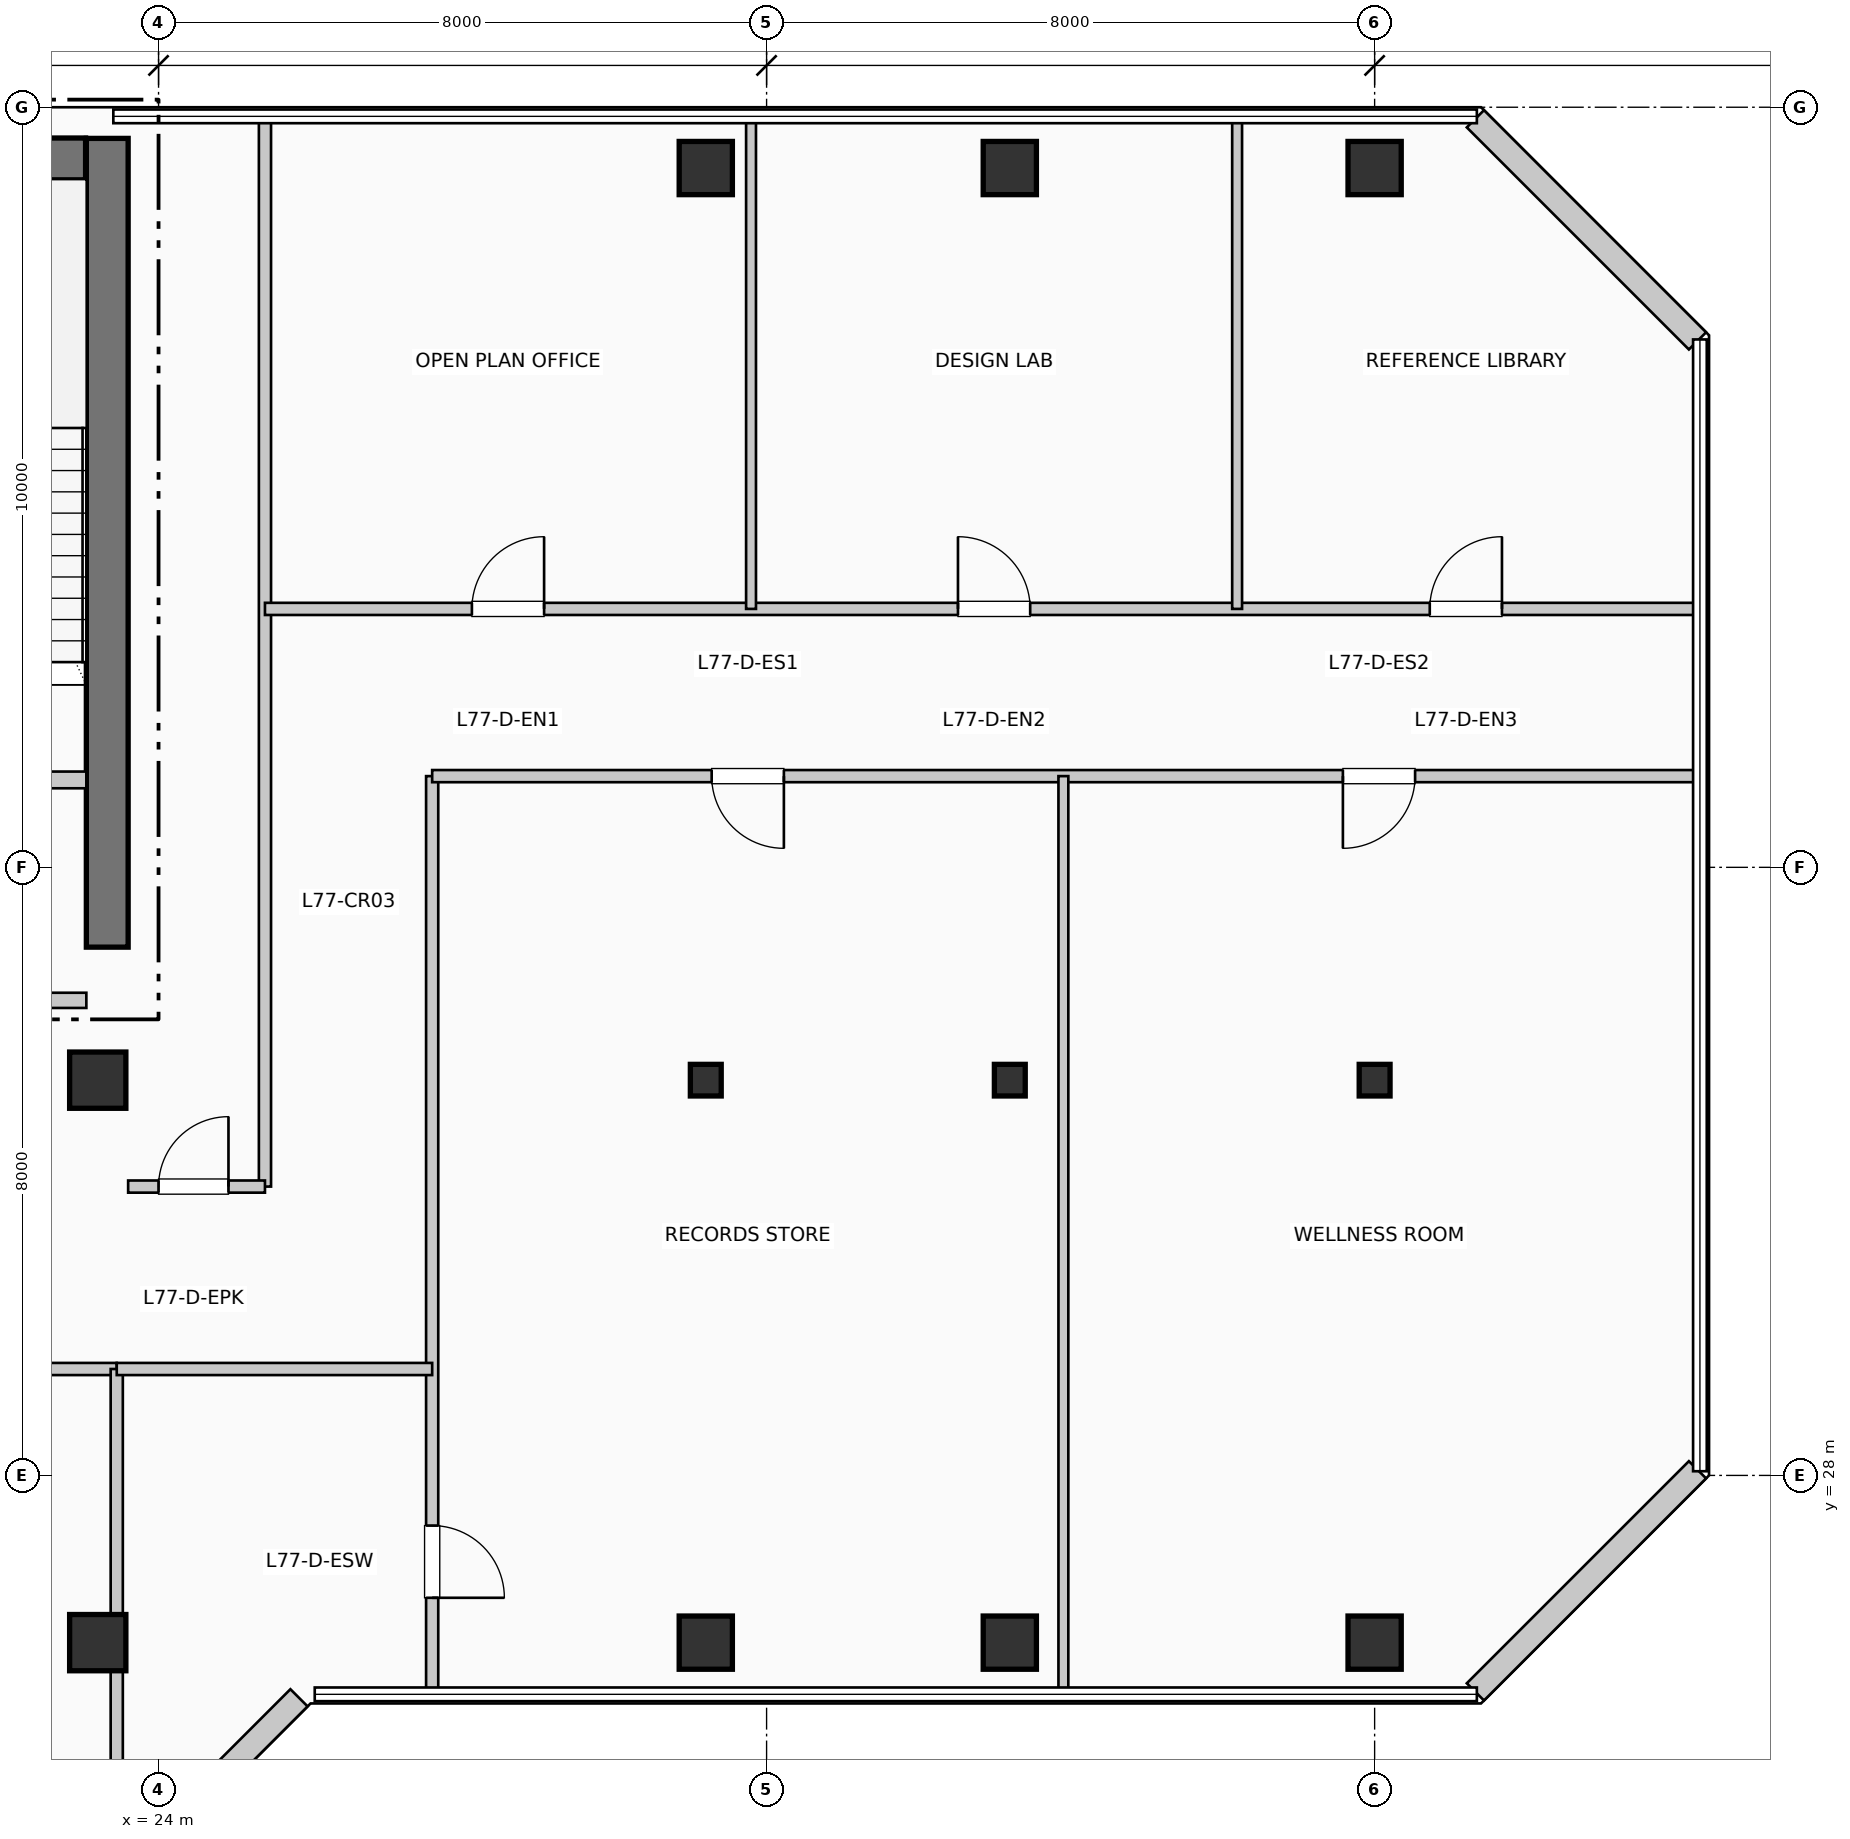
"""IFC4 building model, lengths in metres.
Left out: names, types, materials, properties, quantities, classifications, styles, units other than length and angle.
Written with IfcOpenShell. Run it as: python <this file> out.ifc"""

import sys

from ifc_helpers import new_model, si_unit, direction, frame, frame_2d, origin, origin_2d, place, context, subcontext, project, spatial, rectangle, i_section, extrude, element, fill, save


model = new_model("IFC4")
c1 = context("Model", 3, precision=1e-05, world=origin(), true_north=direction((0.0, 1.0)))
c2 = subcontext(c1, "Body", "Model", "MODEL_VIEW")
j1 = project(units=[si_unit("LENGTHUNIT", "METRE"), si_unit("PLANEANGLEUNIT", "RADIAN")], contexts=[c1])
p1 = place(None, origin())
s1 = spatial("IfcSite", under=j1, at=p1, CompositionType="ELEMENT")
p2 = place(p1, origin())
s2 = spatial("IfcBuilding", under=s1, at=p2, CompositionType="ELEMENT")
p3 = place(p2, frame((0.0, 0.0, 315.81)))
s3 = spatial("IfcBuildingStorey", under=s2, at=p3, CompositionType="ELEMENT", Elevation=315.81)
p4 = place(p3, frame((23.325, 34.95, 0.0), z_axis=(0.0, 0.0, 1.0), x_axis=(0.0, 1.0, 0.0)))
e1 = element("IfcWall", 1, at=p4, inside=s3, PredefinedType="SHEAR", context=c2, shape_type="SweptSolid", body=[
    extrude(rectangle(XDim=10.64, YDim=0.55, at=frame_2d((5.32, 0.0))), origin(), (0.0, 0.0, 1.0), 3.96),
])
p5 = place(p3, frame((19.35, 45.32, 0.0), z_axis=(0.0, 0.0, 1.0), x_axis=(1.0, 0.0, 0.0)))
e2 = element("IfcWall", 2, at=p5, inside=s3, PredefinedType="SHEAR", context=c2, shape_type="SweptSolid", body=[
    extrude(rectangle(XDim=3.69, YDim=0.55, at=frame_2d((1.845, 0.0))), origin(), (0.0, 0.0, 1.0), 3.96),
])
p6 = place(p5, frame((1.15, 0.0, 1.05)))
e3 = element("IfcOpeningElement", 3, at=p6, cuts=e2, PredefinedType="OPENING", context=c2, shape_type="SweptSolid", body=[
    extrude(rectangle(XDim=1.4, YDim=1.8, at=frame_2d((0.7, 0.9))), frame((0.0, 0.285, 0.0), z_axis=(0.0, -1.0, 0.0), x_axis=(1.0, 0.0, 0.0)), (0.0, 0.0, 1.0), 0.57),
])
for number, where, z_axis, x_axis in (
    (4, (23.2, 25.8, 0.0), (0.0, 0.0, 1.0), (1.0, 0.0, 0.0)),
    (5, (23.2, 33.2, 0.0), (0.0, 0.0, 1.0), (1.0, 0.0, 0.0)),
):
    element("IfcColumn", number, at=place(p3, frame(where, z_axis=z_axis, x_axis=x_axis)), inside=s3, PredefinedType="COLUMN", context=c2, shape_type="SweptSolid", body=[
        extrude(rectangle(XDim=0.74, YDim=0.74, at=origin_2d()), origin(), (0.0, 0.0, 1.0), 3.96),
    ])
p7 = place(p3, frame((31.2, 25.8, 0.0), z_axis=(0.0, 0.0, 1.0), x_axis=(1.0, 0.0, 0.0)))
e6 = element("IfcColumn", 6, at=p7, inside=s3, PredefinedType="COLUMN", context=c2, shape_type="SweptSolid", body=[
    extrude(rectangle(XDim=0.7, YDim=0.7, at=origin_2d()), origin(), (0.0, 0.0, 1.0), 3.96),
])
p8 = place(p3, frame((31.2, 33.2, 0.0), z_axis=(0.0, 0.0, 1.0), x_axis=(1.0, 0.0, 0.0)))
e7 = element("IfcColumn", 7, at=p8, inside=s3, PredefinedType="COLUMN", context=c2, shape_type="SweptSolid", body=[
    extrude(i_section(OverallWidth=0.406, OverallDepth=0.416, WebThickness=0.022, FlangeThickness=0.036, at=origin_2d()), origin(), (0.0, 0.0, 1.0), 3.96),
])
for number, where, z_axis, x_axis in (
    (8, (31.2, 45.2, 0.0), (0.0, 0.0, 1.0), (1.0, 0.0, 0.0)),
    (9, (35.2, 25.8, 0.0), (0.0, 0.0, 1.0), (1.0, 0.0, 0.0)),
):
    element("IfcColumn", number, at=place(p3, frame(where, z_axis=z_axis, x_axis=x_axis)), inside=s3, PredefinedType="COLUMN", context=c2, shape_type="SweptSolid", body=[
        extrude(rectangle(XDim=0.7, YDim=0.7, at=origin_2d()), origin(), (0.0, 0.0, 1.0), 3.96),
    ])
p9 = place(p3, frame((35.2, 33.2, 0.0), z_axis=(0.0, 0.0, 1.0), x_axis=(1.0, 0.0, 0.0)))
e10 = element("IfcColumn", 10, at=p9, inside=s3, PredefinedType="COLUMN", context=c2, shape_type="SweptSolid", body=[
    extrude(i_section(OverallWidth=0.406, OverallDepth=0.416, WebThickness=0.022, FlangeThickness=0.036, at=origin_2d()), origin(), (0.0, 0.0, 1.0), 3.96),
])
for number, where, z_axis, x_axis in (
    (11, (35.2, 45.2, 0.0), (0.0, 0.0, 1.0), (1.0, 0.0, 0.0)),
    (12, (40.0, 25.8, 0.0), (0.0, 0.0, 1.0), (1.0, 0.0, 0.0)),
):
    element("IfcColumn", number, at=place(p3, frame(where, z_axis=z_axis, x_axis=x_axis)), inside=s3, PredefinedType="COLUMN", context=c2, shape_type="SweptSolid", body=[
        extrude(rectangle(XDim=0.7, YDim=0.7, at=origin_2d()), origin(), (0.0, 0.0, 1.0), 3.96),
    ])
p10 = place(p3, frame((40.0, 33.2, 0.0), z_axis=(0.0, 0.0, 1.0), x_axis=(1.0, 0.0, 0.0)))
e13 = element("IfcColumn", 13, at=p10, inside=s3, PredefinedType="COLUMN", context=c2, shape_type="SweptSolid", body=[
    extrude(i_section(OverallWidth=0.406, OverallDepth=0.416, WebThickness=0.022, FlangeThickness=0.036, at=origin_2d()), origin(), (0.0, 0.0, 1.0), 3.96),
])
p11 = place(p3, frame((40.0, 45.2, 0.0), z_axis=(0.0, 0.0, 1.0), x_axis=(1.0, 0.0, 0.0)))
e14 = element("IfcColumn", 14, at=p11, inside=s3, PredefinedType="COLUMN", context=c2, shape_type="SweptSolid", body=[
    extrude(rectangle(XDim=0.7, YDim=0.7, at=origin_2d()), origin(), (0.0, 0.0, 1.0), 3.96),
])
p12 = place(p3, frame((23.926, 23.152, 0.0), z_axis=(0.0, 0.0, 1.0), x_axis=(0.707106781187, 0.707106781187, 0.0)))
e15 = element("IfcWall", 15, at=p12, inside=s3, PredefinedType="SOLIDWALL", context=c2, shape_type="SweptSolid", body=[
    extrude(rectangle(XDim=2.718, YDim=0.32, at=frame_2d((1.359, 0.0))), origin(), (0.0, 0.0, 1.0), 3.74),
])
for number, where, z_axis, x_axis in (
    (16, (41.326, 25.152, 0.0), (0.0, 0.0, 1.0), (0.707, 0.707, 0.0)),
    (17, (44.248, 42.926, 0.0), (0.0, 0.0, 1.0), (-0.707, 0.707, 0.0)),
):
    element("IfcWall", number, at=place(p3, frame(where, z_axis=z_axis, x_axis=x_axis)), inside=s3, PredefinedType="SOLIDWALL", context=c2, shape_type="SweptSolid", body=[
        extrude(rectangle(XDim=4.133, YDim=0.32, at=frame_2d((2.066, 0.0))), origin(), (0.0, 0.0, 1.0), 3.74),
    ])
p13 = place(p3, frame((19.9, 37.15, 0.0), z_axis=(0.0, 0.0, 1.0), x_axis=(1.0, 0.0, 0.0)))
e18 = element("IfcWall", 18, at=p13, inside=s3, PredefinedType="PARTITIONING", context=c2, shape_type="SweptSolid", body=[
    extrude(rectangle(XDim=3.15, YDim=0.22, at=frame_2d((1.575, 0.0))), origin(), (0.0, 0.0, 1.0), 3.74),
])
p14 = place(p13, frame((2.05, 0.0, 0.0), z_axis=(0.0, 0.0, 1.0), x_axis=(-1.0, 0.0, 0.0)))
e19 = element("IfcOpeningElement", 19, at=p14, cuts=e18, PredefinedType="OPENING", context=c2, shape_type="SweptSolid", body=[
    extrude(rectangle(XDim=1.05, YDim=2.15, at=frame_2d((0.525, 1.075))), frame((0.0, 0.12, 0.0), z_axis=(0.0, -1.0, 0.0), x_axis=(1.0, 0.0, 0.0)), (0.0, 0.0, 1.0), 0.24),
])
p15 = place(p3, frame((19.8, 34.25, 0.0), z_axis=(0.0, 0.0, 1.0), x_axis=(1.0, 0.0, 0.0)))
e20 = element("IfcWall", 20, at=p15, inside=s3, PredefinedType="PARTITIONING", context=c2, shape_type="SweptSolid", body=[
    extrude(rectangle(XDim=3.25, YDim=0.2, at=frame_2d((1.625, 0.0))), origin(), (0.0, 0.0, 1.0), 3.74),
])
p16 = place(p15, frame((2.15, 0.0, 0.0), z_axis=(0.0, 0.0, 1.0), x_axis=(-1.0, 0.0, 0.0)))
e21 = element("IfcOpeningElement", 21, at=p16, cuts=e20, PredefinedType="OPENING", context=c2, shape_type="SweptSolid", body=[
    extrude(rectangle(XDim=1.1, YDim=2.15, at=frame_2d((0.55, 1.075))), frame((0.0, 0.11, 0.0), z_axis=(0.0, -1.0, 0.0), x_axis=(1.0, 0.0, 0.0)), (0.0, 0.0, 1.0), 0.22),
])
p17 = place(p3, frame((19.2, 29.4, 0.0), z_axis=(0.0, 0.0, 1.0), x_axis=(1.0, 0.0, 0.0)))
e22 = element("IfcWall", 22, at=p17, inside=s3, PredefinedType="PARTITIONING", context=c2, shape_type="SweptSolid", body=[
    extrude(rectangle(XDim=4.25, YDim=0.16, at=frame_2d((2.125, 0.0))), origin(), (0.0, 0.0, 1.0), 3.425),
])
p18 = place(p3, frame((23.45, 5.99, 0.0), z_axis=(0.0, 0.0, 1.0), x_axis=(0.0, 1.0, 0.0)))
e23 = element("IfcWall", 23, at=p18, inside=s3, PredefinedType="PARTITIONING", context=c2, shape_type="SweptSolid", body=[
    extrude(rectangle(XDim=23.41, YDim=0.16, at=frame_2d((11.705, 0.0))), origin(), (0.0, 0.0, 1.0), 3.175),
])
p19 = place(p3, frame((25.4, 31.8, 0.0), z_axis=(0.0, 0.0, 1.0), x_axis=(0.0, 1.0, 0.0)))
e24 = element("IfcWall", 24, at=p19, inside=s3, PredefinedType="PARTITIONING", context=c2, shape_type="SweptSolid", body=[
    extrude(rectangle(XDim=14.01, YDim=0.16, at=frame_2d((7.005, 0.0))), origin(), (0.0, 0.0, 1.0), 3.74),
])
p20 = place(p3, frame((27.6, 25.19, 0.0), z_axis=(0.0, 0.0, 1.0), x_axis=(0.0, 1.0, 0.0)))
e25 = element("IfcWall", 25, at=p20, inside=s3, PredefinedType="PARTITIONING", context=c2, shape_type="SweptSolid", body=[
    extrude(rectangle(XDim=12.01, YDim=0.16, at=frame_2d((6.005, 0.0))), origin(), (0.0, 0.0, 1.0), 3.74),
])
p21 = place(p20, frame((2.15, 0.0, 0.0), z_axis=(0.0, 0.0, 1.0), x_axis=(-1.0, 0.0, 0.0)))
e26 = element("IfcOpeningElement", 26, at=p21, cuts=e25, PredefinedType="OPENING", context=c2, shape_type="SweptSolid", body=[
    extrude(rectangle(XDim=0.95, YDim=2.15, at=frame_2d((0.475, 1.075))), frame((0.0, 0.09, 0.0), z_axis=(0.0, -1.0, 0.0), x_axis=(1.0, 0.0, 0.0)), (0.0, 0.0, 1.0), 0.18),
])
p22 = place(p3, frame((23.45, 29.4, 0.0), z_axis=(0.0, 0.0, 1.0), x_axis=(1.0, 0.0, 0.0)))
e27 = element("IfcWall", 27, at=p22, inside=s3, PredefinedType="PARTITIONING", context=c2, shape_type="SweptSolid", body=[
    extrude(rectangle(XDim=4.15, YDim=0.16, at=frame_2d((2.075, 0.0))), origin(), (0.0, 0.0, 1.0), 3.425),
])
p23 = place(p3, frame((27.6, 37.2, 0.0), z_axis=(0.0, 0.0, 1.0), x_axis=(1.0, 0.0, 0.0)))
e28 = element("IfcWall", 28, at=p23, inside=s3, PredefinedType="PARTITIONING", context=c2, shape_type="SweptSolid", body=[
    extrude(rectangle(XDim=16.61, YDim=0.16, at=frame_2d((8.305, 0.0))), origin(), (0.0, 0.0, 1.0), 3.74),
])
p24 = place(p23, frame((4.627, 0.0, 0.0), z_axis=(0.0, 0.0, 1.0), x_axis=(-1.0, 0.0, 0.0)))
e29 = element("IfcOpeningElement", 29, at=p24, cuts=e28, PredefinedType="OPENING", context=c2, shape_type="SweptSolid", body=[
    extrude(rectangle(XDim=0.95, YDim=2.15, at=frame_2d((0.475, 1.075))), frame((0.0, 0.09, 0.0), z_axis=(0.0, -1.0, 0.0), x_axis=(1.0, 0.0, 0.0)), (0.0, 0.0, 1.0), 0.18),
])
p25 = place(p23, frame((12.932, 0.0, 0.0), z_axis=(0.0, 0.0, 1.0), x_axis=(-1.0, 0.0, 0.0)))
e30 = element("IfcOpeningElement", 30, at=p25, cuts=e28, PredefinedType="OPENING", context=c2, shape_type="SweptSolid", body=[
    extrude(rectangle(XDim=0.95, YDim=2.15, at=frame_2d((0.475, 1.075))), frame((0.0, 0.09, 0.0), z_axis=(0.0, -1.0, 0.0), x_axis=(1.0, 0.0, 0.0)), (0.0, 0.0, 1.0), 0.18),
])
p26 = place(p3, frame((25.4, 39.4, 0.0), z_axis=(0.0, 0.0, 1.0), x_axis=(1.0, 0.0, 0.0)))
e31 = element("IfcWall", 31, at=p26, inside=s3, PredefinedType="PARTITIONING", context=c2, shape_type="SweptSolid", body=[
    extrude(rectangle(XDim=18.81, YDim=0.16, at=frame_2d((9.405, 0.0))), origin(), (0.0, 0.0, 1.0), 3.425),
])
p27 = place(p26, frame((2.723, 0.0, 0.0)))
e32 = element("IfcOpeningElement", 32, at=p27, cuts=e31, PredefinedType="OPENING", context=c2, shape_type="SweptSolid", body=[
    extrude(rectangle(XDim=0.95, YDim=2.15, at=frame_2d((0.475, 1.075))), frame((0.0, 0.09, 0.0), z_axis=(0.0, -1.0, 0.0), x_axis=(1.0, 0.0, 0.0)), (0.0, 0.0, 1.0), 0.18),
])
p28 = place(p26, frame((9.118, 0.0, 0.0)))
e33 = element("IfcOpeningElement", 33, at=p28, cuts=e31, PredefinedType="OPENING", context=c2, shape_type="SweptSolid", body=[
    extrude(rectangle(XDim=0.95, YDim=2.15, at=frame_2d((0.475, 1.075))), frame((0.0, 0.09, 0.0), z_axis=(0.0, -1.0, 0.0), x_axis=(1.0, 0.0, 0.0)), (0.0, 0.0, 1.0), 0.18),
])
p29 = place(p26, frame((15.325, 0.0, 0.0)))
e34 = element("IfcOpeningElement", 34, at=p29, cuts=e31, PredefinedType="OPENING", context=c2, shape_type="SweptSolid", body=[
    extrude(rectangle(XDim=0.95, YDim=2.15, at=frame_2d((0.475, 1.075))), frame((0.0, 0.09, 0.0), z_axis=(0.0, -1.0, 0.0), x_axis=(1.0, 0.0, 0.0)), (0.0, 0.0, 1.0), 0.18),
])
p30 = place(p3, frame((23.6, 31.8, 0.0), z_axis=(0.0, 0.0, 1.0), x_axis=(1.0, 0.0, 0.0)))
e35 = element("IfcWall", 35, at=p30, inside=s3, PredefinedType="PARTITIONING", context=c2, shape_type="SweptSolid", body=[
    extrude(rectangle(XDim=1.8, YDim=0.16, at=frame_2d((0.9, 0.0))), origin(), (0.0, 0.0, 1.0), 3.74),
])
p31 = place(p30, frame((0.4, 0.0, 0.0)))
e36 = element("IfcOpeningElement", 36, at=p31, cuts=e35, PredefinedType="OPENING", context=c2, shape_type="SweptSolid", body=[
    extrude(rectangle(XDim=0.92, YDim=2.1, at=frame_2d((0.46, 1.05))), frame((0.0, 0.09, 0.0), z_axis=(0.0, -1.0, 0.0), x_axis=(1.0, 0.0, 0.0)), (0.0, 0.0, 1.0), 0.18),
])
p32 = place(p3, frame((35.905, 25.19, 0.0), z_axis=(0.0, 0.0, 1.0), x_axis=(0.0, 1.0, 0.0)))
e37 = element("IfcWall", 37, at=p32, inside=s3, PredefinedType="PARTITIONING", context=c2, shape_type="SweptSolid", body=[
    extrude(rectangle(XDim=12.01, YDim=0.13, at=frame_2d((6.005, 0.0))), origin(), (0.0, 0.0, 1.0), 3.74),
])
for number, where, z_axis, x_axis in (
    (38, (31.795, 39.4, 0.0), (0.0, 0.0, 1.0), (0.0, 1.0, 0.0)),
    (39, (38.191, 39.4, 0.0), (0.0, 0.0, 1.0), (0.0, 1.0, 0.0)),
):
    element("IfcWall", number, at=place(p3, frame(where, z_axis=z_axis, x_axis=x_axis)), inside=s3, PredefinedType="PARTITIONING", context=c2, shape_type="SweptSolid", body=[
        extrude(rectangle(XDim=6.41, YDim=0.13, at=frame_2d((3.205, 0.0))), origin(), (0.0, 0.0, 1.0), 3.74),
    ])
p33 = place(p31, origin())
e40 = element("IfcDoor", 40, at=p33, inside=s3, OperationType="SINGLE_SWING_RIGHT", PredefinedType="DOOR", context=c2, shape_type="SweptSolid", body=[
    extrude(rectangle(XDim=0.92, YDim=2.1, at=frame_2d((0.46, 1.05))), frame((0.0, 0.025, 0.0), z_axis=(0.0, -1.0, 0.0), x_axis=(1.0, 0.0, 0.0)), (0.0, 0.0, 1.0), 0.05),
])
fill(e36, e40)
p34 = place(p21, origin())
e41 = element("IfcDoor", 41, at=p34, inside=s3, OperationType="SINGLE_SWING_LEFT", PredefinedType="DOOR", context=c2, shape_type="SweptSolid", body=[
    extrude(rectangle(XDim=0.95, YDim=2.15, at=frame_2d((0.475, 1.075))), frame((0.0, 0.025, 0.0), z_axis=(0.0, -1.0, 0.0), x_axis=(1.0, 0.0, 0.0)), (0.0, 0.0, 1.0), 0.05),
])
fill(e26, e41)
p35 = place(p24, origin())
e42 = element("IfcDoor", 42, at=p35, inside=s3, OperationType="SINGLE_SWING_RIGHT", PredefinedType="DOOR", context=c2, shape_type="SweptSolid", body=[
    extrude(rectangle(XDim=0.95, YDim=2.15, at=frame_2d((0.475, 1.075))), frame((0.0, 0.025, 0.0), z_axis=(0.0, -1.0, 0.0), x_axis=(1.0, 0.0, 0.0)), (0.0, 0.0, 1.0), 0.05),
])
fill(e29, e42)
p36 = place(p25, origin())
e43 = element("IfcDoor", 43, at=p36, inside=s3, OperationType="SINGLE_SWING_LEFT", PredefinedType="DOOR", context=c2, shape_type="SweptSolid", body=[
    extrude(rectangle(XDim=0.95, YDim=2.15, at=frame_2d((0.475, 1.075))), frame((0.0, 0.025, 0.0), z_axis=(0.0, -1.0, 0.0), x_axis=(1.0, 0.0, 0.0)), (0.0, 0.0, 1.0), 0.05),
])
fill(e30, e43)
p37 = place(p27, origin())
e44 = element("IfcDoor", 44, at=p37, inside=s3, OperationType="SINGLE_SWING_RIGHT", PredefinedType="DOOR", context=c2, shape_type="SweptSolid", body=[
    extrude(rectangle(XDim=0.95, YDim=2.15, at=frame_2d((0.475, 1.075))), frame((0.0, 0.025, 0.0), z_axis=(0.0, -1.0, 0.0), x_axis=(1.0, 0.0, 0.0)), (0.0, 0.0, 1.0), 0.05),
])
fill(e32, e44)
p38 = place(p28, origin())
e45 = element("IfcDoor", 45, at=p38, inside=s3, OperationType="SINGLE_SWING_LEFT", PredefinedType="DOOR", context=c2, shape_type="SweptSolid", body=[
    extrude(rectangle(XDim=0.95, YDim=2.15, at=frame_2d((0.475, 1.075))), frame((0.0, 0.025, 0.0), z_axis=(0.0, -1.0, 0.0), x_axis=(1.0, 0.0, 0.0)), (0.0, 0.0, 1.0), 0.05),
])
fill(e33, e45)
p39 = place(p29, origin())
e46 = element("IfcDoor", 46, at=p39, inside=s3, OperationType="SINGLE_SWING_RIGHT", PredefinedType="DOOR", context=c2, shape_type="SweptSolid", body=[
    extrude(rectangle(XDim=0.95, YDim=2.15, at=frame_2d((0.475, 1.075))), frame((0.0, 0.025, 0.0), z_axis=(0.0, -1.0, 0.0), x_axis=(1.0, 0.0, 0.0)), (0.0, 0.0, 1.0), 0.05),
])
fill(e34, e46)
save(model, sys.argv[1])
